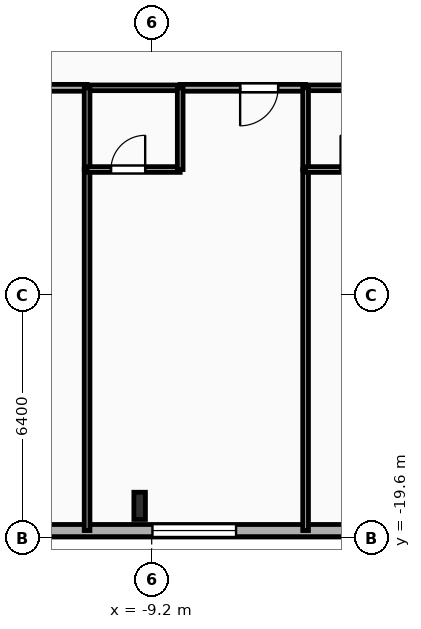
"""IFC4 building model, lengths in metres.
Left out: names, types, materials, properties, quantities, classifications, styles, units other than length and angle.
Written with IfcOpenShell. Run it as: python <this file> out.ifc"""

import sys

from ifc_helpers import new_model, si_unit, direction, frame, frame_2d, origin, origin_2d, place, context, subcontext, project, spatial, rectangle, i_section, extrude, element, fill, save


model = new_model("IFC4")
c1 = context("Model", 3, precision=1e-05, world=origin(), true_north=direction((0.0, 1.0)))
c2 = subcontext(c1, "Body", "Model", "MODEL_VIEW")
j1 = project(units=[si_unit("LENGTHUNIT", "METRE"), si_unit("PLANEANGLEUNIT", "RADIAN")], contexts=[c1])
p1 = place(None, origin())
s1 = spatial("IfcSite", under=j1, at=p1, CompositionType="ELEMENT")
p2 = place(p1, origin())
s2 = spatial("IfcBuilding", under=s1, at=p2, CompositionType="ELEMENT")
p3 = place(p2, frame((0.0, 0.0, 63.85)))
s3 = spatial("IfcBuildingStorey", under=s2, at=p3, CompositionType="ELEMENT", Elevation=63.85)
p4 = place(p3, frame((-9.517, -18.75, 0.0), z_axis=(0.0, 0.0, 1.0), x_axis=(1.0, 0.0, 0.0)))
e1 = element("IfcColumn", 1, at=p4, inside=s3, PredefinedType="COLUMN", context=c2, shape_type="SweptSolid", body=[
    extrude(i_section(OverallWidth=0.304, OverallDepth=0.716, WebThickness=0.021, FlangeThickness=0.04, FilletRadius=0.027, at=origin_2d()), origin(), (0.0, 0.0, 1.0), 3.35),
])
p5 = place(p3, frame((29.2, -19.4, 0.0), z_axis=(0.0, 0.0, 1.0), x_axis=(-1.0, 0.0, 0.0)))
e2 = element("IfcWall", 2, at=p5, inside=s3, PredefinedType="SOLIDWALL", context=c2, shape_type="SweptSolid", body=[
    extrude(rectangle(XDim=58.4, YDim=0.32, at=frame_2d((29.2, 0.0))), origin(), (0.0, 0.0, 1.0), 3.035),
])
p6 = place(p5, frame((2.535, 0.0, 0.85)))
e3 = element("IfcOpeningElement", 3, at=p6, cuts=e2, PredefinedType="OPENING", context=c2, shape_type="SweptSolid", body=[
    extrude(rectangle(XDim=1.65, YDim=1.85, at=frame_2d((0.825, 0.925))), frame((0.0, 0.17, 0.0), z_axis=(0.0, -1.0, 0.0), x_axis=(1.0, 0.0, 0.0)), (0.0, 0.0, 1.0), 0.34),
])
p7 = place(p5, frame((7.975, 0.0, 0.85)))
e4 = element("IfcOpeningElement", 4, at=p7, cuts=e2, PredefinedType="OPENING", context=c2, shape_type="SweptSolid", body=[
    extrude(rectangle(XDim=1.65, YDim=1.85, at=frame_2d((0.825, 0.925))), frame((0.0, 0.17, 0.0), z_axis=(0.0, -1.0, 0.0), x_axis=(1.0, 0.0, 0.0)), (0.0, 0.0, 1.0), 0.34),
])
p8 = place(p5, frame((13.14, 0.0, 0.85)))
e5 = element("IfcOpeningElement", 5, at=p8, cuts=e2, PredefinedType="OPENING", context=c2, shape_type="SweptSolid", body=[
    extrude(rectangle(XDim=2.2, YDim=1.85, at=frame_2d((1.1, 0.925))), frame((0.0, 0.17, 0.0), z_axis=(0.0, -1.0, 0.0), x_axis=(1.0, 0.0, 0.0)), (0.0, 0.0, 1.0), 0.34),
])
p9 = place(p5, frame((19.992, 0.0, 0.85)))
e6 = element("IfcOpeningElement", 6, at=p9, cuts=e2, PredefinedType="OPENING", context=c2, shape_type="SweptSolid", body=[
    extrude(rectangle(XDim=2.2, YDim=1.85, at=frame_2d((1.1, 0.925))), frame((0.0, 0.17, 0.0), z_axis=(0.0, -1.0, 0.0), x_axis=(1.0, 0.0, 0.0)), (0.0, 0.0, 1.0), 0.34),
])
p10 = place(p5, frame((24.66, 0.0, 0.85)))
e7 = element("IfcOpeningElement", 7, at=p10, cuts=e2, PredefinedType="OPENING", context=c2, shape_type="SweptSolid", body=[
    extrude(rectangle(XDim=2.2, YDim=1.85, at=frame_2d((1.1, 0.925))), frame((0.0, 0.17, 0.0), z_axis=(0.0, -1.0, 0.0), x_axis=(1.0, 0.0, 0.0)), (0.0, 0.0, 1.0), 0.34),
])
p11 = place(p5, frame((30.42, 0.0, 0.85)))
e8 = element("IfcOpeningElement", 8, at=p11, cuts=e2, PredefinedType="OPENING", context=c2, shape_type="SweptSolid", body=[
    extrude(rectangle(XDim=2.2, YDim=1.85, at=frame_2d((1.1, 0.925))), frame((0.0, 0.17, 0.0), z_axis=(0.0, -1.0, 0.0), x_axis=(1.0, 0.0, 0.0)), (0.0, 0.0, 1.0), 0.34),
])
p12 = place(p5, frame((36.18, 0.0, 0.85)))
e9 = element("IfcOpeningElement", 9, at=p12, cuts=e2, PredefinedType="OPENING", context=c2, shape_type="SweptSolid", body=[
    extrude(rectangle(XDim=2.2, YDim=1.85, at=frame_2d((1.1, 0.925))), frame((0.0, 0.17, 0.0), z_axis=(0.0, -1.0, 0.0), x_axis=(1.0, 0.0, 0.0)), (0.0, 0.0, 1.0), 0.34),
])
p13 = place(p5, frame((41.94, 0.0, 0.85)))
e10 = element("IfcOpeningElement", 10, at=p13, cuts=e2, PredefinedType="OPENING", context=c2, shape_type="SweptSolid", body=[
    extrude(rectangle(XDim=2.2, YDim=1.85, at=frame_2d((1.1, 0.925))), frame((0.0, 0.17, 0.0), z_axis=(0.0, -1.0, 0.0), x_axis=(1.0, 0.0, 0.0)), (0.0, 0.0, 1.0), 0.34),
])
p14 = place(p5, frame((48.821, 0.0, 0.85)))
e11 = element("IfcOpeningElement", 11, at=p14, cuts=e2, PredefinedType="OPENING", context=c2, shape_type="SweptSolid", body=[
    extrude(rectangle(XDim=1.65, YDim=1.85, at=frame_2d((0.825, 0.925))), frame((0.0, 0.17, 0.0), z_axis=(0.0, -1.0, 0.0), x_axis=(1.0, 0.0, 0.0)), (0.0, 0.0, 1.0), 0.34),
])
p15 = place(p5, frame((53.775, 0.0, 0.85)))
e12 = element("IfcOpeningElement", 12, at=p15, cuts=e2, PredefinedType="OPENING", context=c2, shape_type="SweptSolid", body=[
    extrude(rectangle(XDim=1.65, YDim=1.85, at=frame_2d((0.825, 0.925))), frame((0.0, 0.17, 0.0), z_axis=(0.0, -1.0, 0.0), x_axis=(1.0, 0.0, 0.0)), (0.0, 0.0, 1.0), 0.34),
])
p16 = place(p3, frame((-10.9, -7.75, 0.0), z_axis=(0.0, 0.0, 1.0), x_axis=(-1.0, 0.0, 0.0)))
e13 = element("IfcWall", 13, at=p16, inside=s3, PredefinedType="PARTITIONING", context=c2, shape_type="SweptSolid", body=[
    extrude(rectangle(XDim=3.3, YDim=0.18, at=frame_2d((1.65, 0.0))), origin(), (0.0, 0.0, 1.0), 3.035),
])
p17 = place(p16, frame((1.577, 0.0, 0.0)))
e14 = element("IfcOpeningElement", 14, at=p17, cuts=e13, PredefinedType="OPENING", context=c2, shape_type="SweptSolid", body=[
    extrude(rectangle(XDim=1.0, YDim=2.15, at=frame_2d((0.5, 1.075))), frame((0.0, 0.1, 0.0), z_axis=(0.0, -1.0, 0.0), x_axis=(1.0, 0.0, 0.0)), (0.0, 0.0, 1.0), 0.2),
])
p18 = place(p3, frame((-5.15, -7.75, 0.0), z_axis=(0.0, 0.0, 1.0), x_axis=(-1.0, 0.0, 0.0)))
e15 = element("IfcWall", 15, at=p18, inside=s3, PredefinedType="PARTITIONING", context=c2, shape_type="SweptSolid", body=[
    extrude(rectangle(XDim=3.3, YDim=0.18, at=frame_2d((1.65, 0.0))), origin(), (0.0, 0.0, 1.0), 3.035),
])
p19 = place(p18, frame((0.722, 0.0, 0.0)))
e16 = element("IfcOpeningElement", 16, at=p19, cuts=e15, PredefinedType="OPENING", context=c2, shape_type="SweptSolid", body=[
    extrude(rectangle(XDim=1.0, YDim=2.15, at=frame_2d((0.5, 1.075))), frame((0.0, 0.1, 0.0), z_axis=(0.0, -1.0, 0.0), x_axis=(1.0, 0.0, 0.0)), (0.0, 0.0, 1.0), 0.2),
])
for number, where, z_axis, x_axis in (
    (17, (-8.45, -7.75, 0.0), (0.0, 0.0, 1.0), (-1.0, 0.0, 0.0)),
    (18, (-2.7, -7.75, 0.0), (0.0, 0.0, 1.0), (-1.0, 0.0, 0.0)),
):
    element("IfcWall", number, at=place(p3, frame(where, z_axis=z_axis, x_axis=x_axis)), inside=s3, PredefinedType="PLUMBINGWALL", context=c2, shape_type="SweptSolid", body=[
        extrude(rectangle(XDim=2.45, YDim=0.15, at=frame_2d((1.225, 0.0))), origin(), (0.0, 0.0, 1.0), 3.035),
    ])
p20 = place(p3, frame((-10.9, -9.9, 0.0), z_axis=(0.0, 0.0, 1.0), x_axis=(0.0, -1.0, 0.0)))
e19 = element("IfcWall", 19, at=p20, inside=s3, PredefinedType="PARTITIONING", context=c2, shape_type="SweptSolid", body=[
    extrude(rectangle(XDim=9.5, YDim=0.15, at=frame_2d((4.75, 0.0))), origin(), (0.0, 0.0, 1.0), 3.035),
])
p21 = place(p3, frame((-10.9, -7.75, 0.0), z_axis=(0.0, 0.0, 1.0), x_axis=(0.0, -1.0, 0.0)))
e20 = element("IfcWall", 20, at=p21, inside=s3, PredefinedType="PLUMBINGWALL", context=c2, shape_type="SweptSolid", body=[
    extrude(rectangle(XDim=2.15, YDim=0.15, at=frame_2d((1.075, 0.0))), origin(), (0.0, 0.0, 1.0), 3.035),
])
p22 = place(p3, frame((-10.9, -9.9, 0.0), z_axis=(0.0, 0.0, 1.0), x_axis=(1.0, 0.0, 0.0)))
e21 = element("IfcWall", 21, at=p22, inside=s3, PredefinedType="PLUMBINGWALL", context=c2, shape_type="SweptSolid", body=[
    extrude(rectangle(XDim=2.45, YDim=0.15, at=frame_2d((1.225, 0.0))), origin(), (0.0, 0.0, 1.0), 3.035),
])
p23 = place(p22, frame((0.629, 0.0, 0.0)))
e22 = element("IfcOpeningElement", 22, at=p23, cuts=e21, PredefinedType="OPENING", context=c2, shape_type="SweptSolid", body=[
    extrude(rectangle(XDim=0.9, YDim=2.1, at=frame_2d((0.45, 1.05))), frame((0.0, 0.085, 0.0), z_axis=(0.0, -1.0, 0.0), x_axis=(1.0, 0.0, 0.0)), (0.0, 0.0, 1.0), 0.17),
])
p24 = place(p3, frame((-8.45, -9.9, 0.0), z_axis=(0.0, 0.0, 1.0), x_axis=(0.0, 1.0, 0.0)))
e23 = element("IfcWall", 23, at=p24, inside=s3, PredefinedType="PLUMBINGWALL", context=c2, shape_type="SweptSolid", body=[
    extrude(rectangle(XDim=2.15, YDim=0.15, at=frame_2d((1.075, 0.0))), origin(), (0.0, 0.0, 1.0), 3.035),
])
p25 = place(p3, frame((-5.15, -9.9, 0.0), z_axis=(0.0, 0.0, 1.0), x_axis=(0.0, -1.0, 0.0)))
e24 = element("IfcWall", 24, at=p25, inside=s3, PredefinedType="PARTITIONING", context=c2, shape_type="SweptSolid", body=[
    extrude(rectangle(XDim=9.5, YDim=0.15, at=frame_2d((4.75, 0.0))), origin(), (0.0, 0.0, 1.0), 3.035),
])
p26 = place(p3, frame((-5.15, -7.75, 0.0), z_axis=(0.0, 0.0, 1.0), x_axis=(0.0, -1.0, 0.0)))
e25 = element("IfcWall", 25, at=p26, inside=s3, PredefinedType="PLUMBINGWALL", context=c2, shape_type="SweptSolid", body=[
    extrude(rectangle(XDim=2.15, YDim=0.15, at=frame_2d((1.075, 0.0))), origin(), (0.0, 0.0, 1.0), 3.035),
])
p27 = place(p3, frame((-5.15, -9.9, 0.0), z_axis=(0.0, 0.0, 1.0), x_axis=(1.0, 0.0, 0.0)))
e26 = element("IfcWall", 26, at=p27, inside=s3, PredefinedType="PLUMBINGWALL", context=c2, shape_type="SweptSolid", body=[
    extrude(rectangle(XDim=2.45, YDim=0.15, at=frame_2d((1.225, 0.0))), origin(), (0.0, 0.0, 1.0), 3.035),
])
p28 = place(p27, frame((0.921, 0.0, 0.0)))
e27 = element("IfcOpeningElement", 27, at=p28, cuts=e26, PredefinedType="OPENING", context=c2, shape_type="SweptSolid", body=[
    extrude(rectangle(XDim=0.9, YDim=2.1, at=frame_2d((0.45, 1.05))), frame((0.0, 0.085, 0.0), z_axis=(0.0, -1.0, 0.0), x_axis=(1.0, 0.0, 0.0)), (0.0, 0.0, 1.0), 0.17),
])
p29 = place(p12, origin())
e28 = element("IfcWindow", 28, at=p29, inside=s3, PartitioningType="SINGLE_PANEL", PredefinedType="WINDOW", context=c2, shape_type="SweptSolid", body=[
    extrude(rectangle(XDim=2.2, YDim=1.85, at=frame_2d((1.1, 0.925))), frame((0.0, 0.03, 0.0), z_axis=(0.0, -1.0, 0.0), x_axis=(1.0, 0.0, 0.0)), (0.0, 0.0, 1.0), 0.06),
])
fill(e9, e28)
p30 = place(p19, origin())
e29 = element("IfcDoor", 29, at=p30, inside=s3, OperationType="SINGLE_SWING_RIGHT", PredefinedType="DOOR", context=c2, shape_type="SweptSolid", body=[
    extrude(rectangle(XDim=1.0, YDim=2.15, at=frame_2d((0.5, 1.075))), frame((0.0, 0.025, 0.0), z_axis=(0.0, -1.0, 0.0), x_axis=(1.0, 0.0, 0.0)), (0.0, 0.0, 1.0), 0.05),
])
fill(e16, e29)
p31 = place(p23, origin())
e30 = element("IfcDoor", 30, at=p31, inside=s3, OperationType="SINGLE_SWING_RIGHT", PredefinedType="DOOR", context=c2, shape_type="SweptSolid", body=[
    extrude(rectangle(XDim=0.9, YDim=2.1, at=frame_2d((0.45, 1.05))), frame((0.0, 0.025, 0.0), z_axis=(0.0, -1.0, 0.0), x_axis=(1.0, 0.0, 0.0)), (0.0, 0.0, 1.0), 0.05),
])
fill(e22, e30)
p32 = place(p28, origin())
e31 = element("IfcDoor", 31, at=p32, inside=s3, OperationType="SINGLE_SWING_LEFT", PredefinedType="DOOR", context=c2, shape_type="SweptSolid", body=[
    extrude(rectangle(XDim=0.9, YDim=2.1, at=frame_2d((0.45, 1.05))), frame((0.0, 0.025, 0.0), z_axis=(0.0, -1.0, 0.0), x_axis=(1.0, 0.0, 0.0)), (0.0, 0.0, 1.0), 0.05),
])
fill(e27, e31)
save(model, sys.argv[1])
